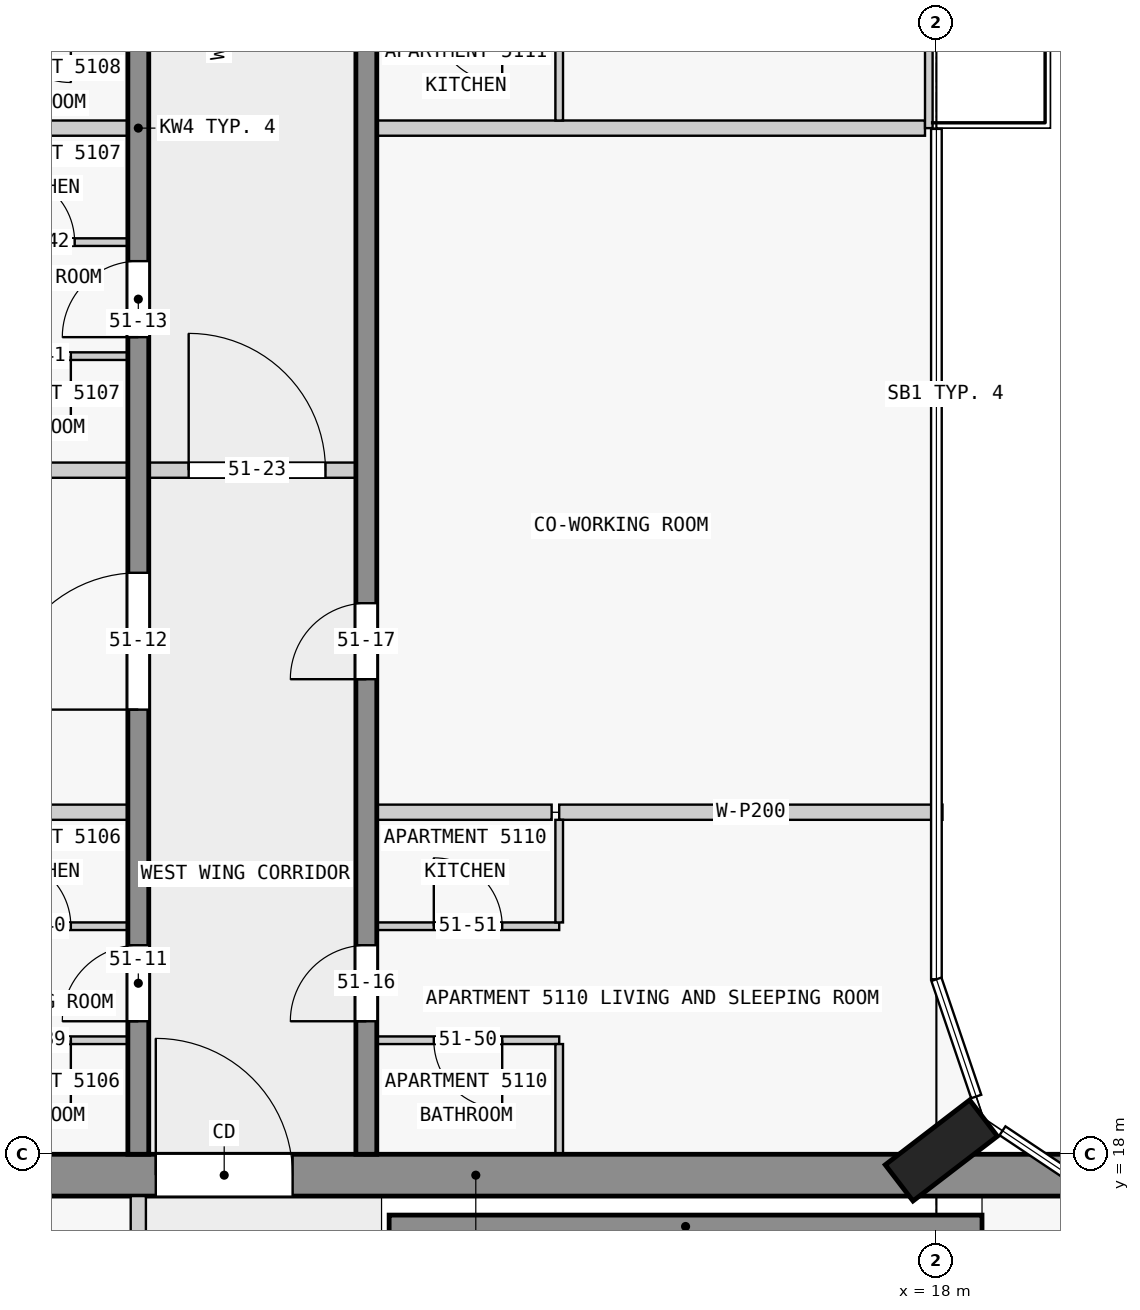
"""IFC4 building model, lengths in metres.
Left out: names, types, materials, properties, quantities, classifications, styles, units other than length and angle.
Written with IfcOpenShell. Run it as: python <this file> out.ifc"""

import sys

from ifc_helpers import new_model, si_unit, direction, frame, frame_2d, origin, origin_2d, place, context, subcontext, project, spatial, rectangle, extrude, element, fill, save


model = new_model("IFC4")
c1 = context("Model", 3, precision=1e-05, world=origin(), true_north=direction((0.0, 1.0)))
c2 = subcontext(c1, "Body", "Model", "MODEL_VIEW")
j1 = project(units=[si_unit("LENGTHUNIT", "METRE"), si_unit("PLANEANGLEUNIT", "RADIAN")], contexts=[c1])
p1 = place(None, origin())
s1 = spatial("IfcSite", under=j1, at=p1, CompositionType="ELEMENT")
p2 = place(p1, origin())
s2 = spatial("IfcBuilding", under=s1, at=p2, CompositionType="ELEMENT")
p3 = place(p2, frame((0.0, 0.0, 197.9)))
s3 = spatial("IfcBuildingStorey", under=s2, at=p3, CompositionType="ELEMENT", Elevation=197.9)
p4 = place(p3, frame((18.065, 18.05, 0.0), z_axis=(0.0, 0.0, 1.0), x_axis=(-0.608810846443, 0.793315418515, 0.0)))
e1 = element("IfcColumn", 1, at=p4, inside=s3, PredefinedType="COLUMN", context=c2, shape_type="SweptSolid", body=[
    extrude(rectangle(XDim=0.6, YDim=1.4, at=origin_2d()), origin(), (0.0, 0.0, 1.0), 3.5),
])
p5 = place(p3, frame((1.38, 17.725, 0.0), z_axis=(0.0, 0.0, 1.0), x_axis=(1.0, 0.0, 0.0)))
e2 = element("IfcWall", 2, at=p5, inside=s3, PredefinedType="SHEAR", context=c2, shape_type="SweptSolid", body=[
    extrude(rectangle(XDim=21.12, YDim=0.55, at=frame_2d((10.56, 0.0))), origin(), (0.0, 0.0, 1.0), 3.25),
])
p6 = place(p5, frame((6.35, 0.0, 0.0)))
e3 = element("IfcOpeningElement", 3, at=p6, cuts=e2, PredefinedType="OPENING", context=c2, shape_type="SweptSolid", body=[
    extrude(rectangle(XDim=1.8, YDim=2.1, at=frame_2d((0.9, 1.05))), frame((0.0, 0.285, 0.0), z_axis=(0.0, -1.0, 0.0), x_axis=(1.0, 0.0, 0.0)), (0.0, 0.0, 1.0), 0.57),
])
p7 = place(p3, frame((10.8, 17.05, 0.0), z_axis=(0.0, 0.0, 1.0), x_axis=(1.0, 0.0, 0.0)))
e4 = element("IfcWall", 4, at=p7, inside=s3, PredefinedType="SHEAR", context=c2, shape_type="SweptSolid", body=[
    extrude(rectangle(XDim=7.8, YDim=0.3, at=frame_2d((3.9, 0.0))), origin(), (0.0, 0.0, 1.0), 3.25),
])
p8 = place(p3, frame((7.5, 18.0, 0.0), z_axis=(0.0, 0.0, 1.0), x_axis=(0.0, 1.0, 0.0)))
e5 = element("IfcWall", 5, at=p8, inside=s3, PredefinedType="SHEAR", context=c2, shape_type="SweptSolid", body=[
    extrude(rectangle(XDim=27.0, YDim=0.275, at=frame_2d((13.5, 0.0))), origin(), (0.0, 0.0, 1.0), 3.25),
])
p9 = place(p8, frame((1.75, 0.0, 0.0)))
e6 = element("IfcOpeningElement", 6, at=p9, cuts=e5, PredefinedType="OPENING", context=c2, shape_type="SweptSolid", body=[
    extrude(rectangle(XDim=1.0, YDim=2.1, at=frame_2d((0.5, 1.05))), frame((0.0, 0.147, 0.0), z_axis=(0.0, -1.0, 0.0), x_axis=(1.0, 0.0, 0.0)), (0.0, 0.0, 1.0), 0.295),
])
p10 = place(p8, frame((5.85, 0.0, 0.0)))
e7 = element("IfcOpeningElement", 7, at=p10, cuts=e5, PredefinedType="OPENING", context=c2, shape_type="SweptSolid", body=[
    extrude(rectangle(XDim=1.8, YDim=2.1, at=frame_2d((0.9, 1.05))), frame((0.0, 0.147, 0.0), z_axis=(0.0, -1.0, 0.0), x_axis=(1.0, 0.0, 0.0)), (0.0, 0.0, 1.0), 0.295),
])
p11 = place(p8, frame((10.75, 0.0, 0.0)))
e8 = element("IfcOpeningElement", 8, at=p11, cuts=e5, PredefinedType="OPENING", context=c2, shape_type="SweptSolid", body=[
    extrude(rectangle(XDim=1.0, YDim=2.1, at=frame_2d((0.5, 1.05))), frame((0.0, 0.147, 0.0), z_axis=(0.0, -1.0, 0.0), x_axis=(1.0, 0.0, 0.0)), (0.0, 0.0, 1.0), 0.295),
])
p12 = place(p8, frame((15.25, 0.0, 0.0)))
e9 = element("IfcOpeningElement", 9, at=p12, cuts=e5, PredefinedType="OPENING", context=c2, shape_type="SweptSolid", body=[
    extrude(rectangle(XDim=1.0, YDim=2.1, at=frame_2d((0.5, 1.05))), frame((0.0, 0.147, 0.0), z_axis=(0.0, -1.0, 0.0), x_axis=(1.0, 0.0, 0.0)), (0.0, 0.0, 1.0), 0.295),
])
p13 = place(p8, frame((21.35, 0.0, 0.0)))
e10 = element("IfcOpeningElement", 10, at=p13, cuts=e5, PredefinedType="OPENING", context=c2, shape_type="SweptSolid", body=[
    extrude(rectangle(XDim=1.0, YDim=2.1, at=frame_2d((0.5, 1.05))), frame((0.0, 0.147, 0.0), z_axis=(0.0, -1.0, 0.0), x_axis=(1.0, 0.0, 0.0)), (0.0, 0.0, 1.0), 0.295),
])
p14 = place(p3, frame((10.5, 18.0, 0.0), z_axis=(0.0, 0.0, 1.0), x_axis=(0.0, 1.0, 0.0)))
e11 = element("IfcWall", 11, at=p14, inside=s3, PredefinedType="SHEAR", context=c2, shape_type="SweptSolid", body=[
    extrude(rectangle(XDim=27.0, YDim=0.275, at=frame_2d((13.5, 0.0))), origin(), (0.0, 0.0, 1.0), 3.25),
])
p15 = place(p14, frame((1.75, 0.0, 0.0)))
e12 = element("IfcOpeningElement", 12, at=p15, cuts=e11, PredefinedType="OPENING", context=c2, shape_type="SweptSolid", body=[
    extrude(rectangle(XDim=1.0, YDim=2.1, at=frame_2d((0.5, 1.05))), frame((0.0, 0.147, 0.0), z_axis=(0.0, -1.0, 0.0), x_axis=(1.0, 0.0, 0.0)), (0.0, 0.0, 1.0), 0.295),
])
p16 = place(p14, frame((6.25, 0.0, 0.0)))
e13 = element("IfcOpeningElement", 13, at=p16, cuts=e11, PredefinedType="OPENING", context=c2, shape_type="SweptSolid", body=[
    extrude(rectangle(XDim=1.0, YDim=2.1, at=frame_2d((0.5, 1.05))), frame((0.0, 0.147, 0.0), z_axis=(0.0, -1.0, 0.0), x_axis=(1.0, 0.0, 0.0)), (0.0, 0.0, 1.0), 0.295),
])
p17 = place(p14, frame((15.25, 0.0, 0.0)))
e14 = element("IfcOpeningElement", 14, at=p17, cuts=e11, PredefinedType="OPENING", context=c2, shape_type="SweptSolid", body=[
    extrude(rectangle(XDim=1.0, YDim=2.1, at=frame_2d((0.5, 1.05))), frame((0.0, 0.147, 0.0), z_axis=(0.0, -1.0, 0.0), x_axis=(1.0, 0.0, 0.0)), (0.0, 0.0, 1.0), 0.295),
])
p18 = place(p14, frame((19.75, 0.0, 0.0)))
e15 = element("IfcOpeningElement", 15, at=p18, cuts=e11, PredefinedType="OPENING", context=c2, shape_type="SweptSolid", body=[
    extrude(rectangle(XDim=1.0, YDim=2.1, at=frame_2d((0.5, 1.05))), frame((0.0, 0.147, 0.0), z_axis=(0.0, -1.0, 0.0), x_axis=(1.0, 0.0, 0.0)), (0.0, 0.0, 1.0), 0.295),
])
p19 = place(p14, frame((23.25, 0.0, 0.0)))
e16 = element("IfcOpeningElement", 16, at=p19, cuts=e11, PredefinedType="OPENING", context=c2, shape_type="SweptSolid", body=[
    extrude(rectangle(XDim=0.9, YDim=2.1, at=frame_2d((0.45, 1.05))), frame((0.0, 0.147, 0.0), z_axis=(0.0, -1.0, 0.0), x_axis=(1.0, 0.0, 0.0)), (0.0, 0.0, 1.0), 0.295),
])
p20 = place(p14, frame((25.45, 0.0, 0.0)))
e17 = element("IfcOpeningElement", 17, at=p20, cuts=e11, PredefinedType="OPENING", context=c2, shape_type="SweptSolid", body=[
    extrude(rectangle(XDim=1.0, YDim=2.1, at=frame_2d((0.5, 1.05))), frame((0.0, 0.147, 0.0), z_axis=(0.0, -1.0, 0.0), x_axis=(1.0, 0.0, 0.0)), (0.0, 0.0, 1.0), 0.295),
])
p21 = place(p3, frame((17.9, 36.0, 0.0), z_axis=(0.0, 0.0, 1.0), x_axis=(0.0, -1.0, 0.0)))
e18 = element("IfcWall", 18, at=p21, inside=s3, PredefinedType="STANDARD", context=c2, shape_type="SweptSolid", body=[
    extrude(rectangle(XDim=4.5, YDim=0.1, at=frame_2d((2.25, 0.0))), origin(), (0.0, 0.0, 1.0), 3.25),
])
p22 = place(p21, frame((1.05, 0.0, 0.0)))
e19 = element("IfcOpeningElement", 19, at=p22, cuts=e18, PredefinedType="OPENING", context=c2, shape_type="SweptSolid", body=[
    extrude(rectangle(XDim=2.4, YDim=2.4, at=frame_2d((1.2, 1.2))), frame((0.0, 0.06, 0.0), z_axis=(0.0, -1.0, 0.0), x_axis=(1.0, 0.0, 0.0)), (0.0, 0.0, 1.0), 0.12),
])
p23 = place(p3, frame((7.5, 10.1, 0.0), z_axis=(0.0, 0.0, 1.0), x_axis=(0.0, 1.0, 0.0)))
e20 = element("IfcWall", 20, at=p23, inside=s3, PredefinedType="PARTITIONING", context=c2, shape_type="SweptSolid", body=[
    extrude(rectangle(XDim=7.35, YDim=0.2, at=frame_2d((3.675, 0.0))), origin(), (0.0, 0.0, 1.0), 3.25),
])
p24 = place(p23, frame((0.8, 0.0, 0.0)))
e21 = element("IfcOpeningElement", 21, at=p24, cuts=e20, PredefinedType="OPENING", context=c2, shape_type="SweptSolid", body=[
    extrude(rectangle(XDim=0.9, YDim=2.1, at=frame_2d((0.45, 1.05))), frame((0.0, 0.11, 0.0), z_axis=(0.0, -1.0, 0.0), x_axis=(1.0, 0.0, 0.0)), (0.0, 0.0, 1.0), 0.22),
])
p25 = place(p23, frame((3.3, 0.0, 0.0)))
e22 = element("IfcOpeningElement", 22, at=p25, cuts=e20, PredefinedType="OPENING", context=c2, shape_type="SweptSolid", body=[
    extrude(rectangle(XDim=0.9, YDim=2.1, at=frame_2d((0.45, 1.05))), frame((0.0, 0.11, 0.0), z_axis=(0.0, -1.0, 0.0), x_axis=(1.0, 0.0, 0.0)), (0.0, 0.0, 1.0), 0.22),
])
p26 = place(p23, frame((5.25, 0.0, 0.0)))
e23 = element("IfcOpeningElement", 23, at=p26, cuts=e20, PredefinedType="OPENING", context=c2, shape_type="SweptSolid", body=[
    extrude(rectangle(XDim=0.9, YDim=2.1, at=frame_2d((0.45, 1.05))), frame((0.0, 0.11, 0.0), z_axis=(0.0, -1.0, 0.0), x_axis=(1.0, 0.0, 0.0)), (0.0, 0.0, 1.0), 0.22),
])
p27 = place(p3, frame((7.363, 19.5, 0.0), z_axis=(0.0, 0.0, 1.0), x_axis=(-1.0, 0.0, 0.0)))
e24 = element("IfcWall", 24, at=p27, inside=s3, PredefinedType="PARTITIONING", context=c2, shape_type="SweptSolid", body=[
    extrude(rectangle(XDim=2.4, YDim=0.1, at=frame_2d((1.2, 0.0))), origin(), (0.0, 0.0, 1.0), 3.25),
])
p28 = place(p27, frame((0.75, 0.0, 0.0)))
e25 = element("IfcOpeningElement", 25, at=p28, cuts=e24, PredefinedType="OPENING", context=c2, shape_type="SweptSolid", body=[
    extrude(rectangle(XDim=0.9, YDim=2.1, at=frame_2d((0.45, 1.05))), frame((0.0, 0.06, 0.0), z_axis=(0.0, -1.0, 0.0), x_axis=(1.0, 0.0, 0.0)), (0.0, 0.0, 1.0), 0.12),
])
p29 = place(p3, frame((13.038, 19.5, 0.0), z_axis=(0.0, 0.0, 1.0), x_axis=(-1.0, 0.0, 0.0)))
e26 = element("IfcWall", 26, at=p29, inside=s3, PredefinedType="PARTITIONING", context=c2, shape_type="SweptSolid", body=[
    extrude(rectangle(XDim=2.4, YDim=0.1, at=frame_2d((1.2, 0.0))), origin(), (0.0, 0.0, 1.0), 3.25),
])
p30 = place(p29, frame((0.75, 0.0, 0.0)))
e27 = element("IfcOpeningElement", 27, at=p30, cuts=e26, PredefinedType="OPENING", context=c2, shape_type="SweptSolid", body=[
    extrude(rectangle(XDim=0.9, YDim=2.1, at=frame_2d((0.45, 1.05))), frame((0.0, 0.06, 0.0), z_axis=(0.0, -1.0, 0.0), x_axis=(1.0, 0.0, 0.0)), (0.0, 0.0, 1.0), 0.12),
])
p31 = place(p3, frame((4.962, 21.0, 0.0), z_axis=(0.0, 0.0, 1.0), x_axis=(1.0, 0.0, 0.0)))
e28 = element("IfcWall", 28, at=p31, inside=s3, PredefinedType="PARTITIONING", context=c2, shape_type="SweptSolid", body=[
    extrude(rectangle(XDim=2.4, YDim=0.1, at=frame_2d((1.2, 0.0))), origin(), (0.0, 0.0, 1.0), 3.25),
])
p32 = place(p31, frame((0.75, 0.0, 0.0)))
e29 = element("IfcOpeningElement", 29, at=p32, cuts=e28, PredefinedType="OPENING", context=c2, shape_type="SweptSolid", body=[
    extrude(rectangle(XDim=0.9, YDim=2.1, at=frame_2d((0.45, 1.05))), frame((0.0, 0.06, 0.0), z_axis=(0.0, -1.0, 0.0), x_axis=(1.0, 0.0, 0.0)), (0.0, 0.0, 1.0), 0.12),
])
p33 = place(p3, frame((10.637, 21.0, 0.0), z_axis=(0.0, 0.0, 1.0), x_axis=(1.0, 0.0, 0.0)))
e30 = element("IfcWall", 30, at=p33, inside=s3, PredefinedType="PARTITIONING", context=c2, shape_type="SweptSolid", body=[
    extrude(rectangle(XDim=2.4, YDim=0.1, at=frame_2d((1.2, 0.0))), origin(), (0.0, 0.0, 1.0), 3.25),
])
p34 = place(p33, frame((0.75, 0.0, 0.0)))
e31 = element("IfcOpeningElement", 31, at=p34, cuts=e30, PredefinedType="OPENING", context=c2, shape_type="SweptSolid", body=[
    extrude(rectangle(XDim=0.9, YDim=2.1, at=frame_2d((0.45, 1.05))), frame((0.0, 0.06, 0.0), z_axis=(0.0, -1.0, 0.0), x_axis=(1.0, 0.0, 0.0)), (0.0, 0.0, 1.0), 0.12),
])
for number, where, z_axis, x_axis in (
    (32, (7.363, 22.5, 0.0), (0.0, 0.0, 1.0), (-1.0, 0.0, 0.0)),
    (33, (12.938, 22.5, 0.0), (0.0, 0.0, 1.0), (-1.0, 0.0, 0.0)),
):
    element("IfcWall", number, at=place(p3, frame(where, z_axis=z_axis, x_axis=x_axis)), inside=s3, PredefinedType="PARTITIONING", context=c2, shape_type="SweptSolid", body=[
        extrude(rectangle(XDim=2.3, YDim=0.2, at=frame_2d((1.15, 0.0))), origin(), (0.0, 0.0, 1.0), 3.25),
    ])
p35 = place(p3, frame((13.038, 22.5, 0.0), z_axis=(0.0, 0.0, 1.0), x_axis=(1.0, 0.0, 0.0)))
e34 = element("IfcWall", 34, at=p35, inside=s3, PredefinedType="PARTITIONING", context=c2, shape_type="SweptSolid", body=[
    extrude(rectangle(XDim=5.042, YDim=0.2, at=frame_2d((2.521, 0.0))), origin(), (0.0, 0.0, 1.0), 3.25),
])
p36 = place(p3, frame((7.363, 27.0, 0.0), z_axis=(0.0, 0.0, 1.0), x_axis=(-1.0, 0.0, 0.0)))
e35 = element("IfcWall", 35, at=p36, inside=s3, PredefinedType="PARTITIONING", context=c2, shape_type="SweptSolid", body=[
    extrude(rectangle(XDim=7.443, YDim=0.2, at=frame_2d((3.721, 0.0))), origin(), (0.0, 0.0, 1.0), 3.25),
])
p37 = place(p3, frame((7.363, 28.5, 0.0), z_axis=(0.0, 0.0, 1.0), x_axis=(-1.0, 0.0, 0.0)))
e36 = element("IfcWall", 36, at=p37, inside=s3, PredefinedType="PARTITIONING", context=c2, shape_type="SweptSolid", body=[
    extrude(rectangle(XDim=2.4, YDim=0.1, at=frame_2d((1.2, 0.0))), origin(), (0.0, 0.0, 1.0), 3.25),
])
p38 = place(p37, frame((0.75, 0.0, 0.0)))
e37 = element("IfcOpeningElement", 37, at=p38, cuts=e36, PredefinedType="OPENING", context=c2, shape_type="SweptSolid", body=[
    extrude(rectangle(XDim=0.9, YDim=2.1, at=frame_2d((0.45, 1.05))), frame((0.0, 0.06, 0.0), z_axis=(0.0, -1.0, 0.0), x_axis=(1.0, 0.0, 0.0)), (0.0, 0.0, 1.0), 0.12),
])
p39 = place(p3, frame((5.012, 30.0, 0.0), z_axis=(0.0, 0.0, 1.0), x_axis=(1.0, 0.0, 0.0)))
e38 = element("IfcWall", 38, at=p39, inside=s3, PredefinedType="PARTITIONING", context=c2, shape_type="SweptSolid", body=[
    extrude(rectangle(XDim=2.35, YDim=0.1, at=frame_2d((1.175, 0.0))), origin(), (0.0, 0.0, 1.0), 3.25),
])
p40 = place(p39, frame((0.75, 0.0, 0.0)))
e39 = element("IfcOpeningElement", 39, at=p40, cuts=e38, PredefinedType="OPENING", context=c2, shape_type="SweptSolid", body=[
    extrude(rectangle(XDim=0.9, YDim=2.1, at=frame_2d((0.45, 1.05))), frame((0.0, 0.06, 0.0), z_axis=(0.0, -1.0, 0.0), x_axis=(1.0, 0.0, 0.0)), (0.0, 0.0, 1.0), 0.12),
])
p41 = place(p3, frame((7.363, 31.5, 0.0), z_axis=(0.0, 0.0, 1.0), x_axis=(-1.0, 0.0, 0.0)))
e40 = element("IfcWall", 40, at=p41, inside=s3, PredefinedType="PARTITIONING", context=c2, shape_type="SweptSolid", body=[
    extrude(rectangle(XDim=2.3, YDim=0.2, at=frame_2d((1.15, 0.0))), origin(), (0.0, 0.0, 1.0), 3.25),
])
p42 = place(p3, frame((17.85, 31.5, 0.0), z_axis=(0.0, 0.0, 1.0), x_axis=(-1.0, 0.0, 0.0)))
e41 = element("IfcWall", 41, at=p42, inside=s3, PredefinedType="PARTITIONING", context=c2, shape_type="SweptSolid", body=[
    extrude(rectangle(XDim=7.213, YDim=0.2, at=frame_2d((3.606, 0.0))), origin(), (0.0, 0.0, 1.0), 3.25),
])
p43 = place(p3, frame((13.038, 18.0, 0.0), z_axis=(0.0, 0.0, 1.0), x_axis=(0.0, 1.0, 0.0)))
e42 = element("IfcWall", 42, at=p43, inside=s3, PredefinedType="PARTITIONING", context=c2, shape_type="SweptSolid", body=[
    extrude(rectangle(XDim=1.45, YDim=0.1, at=frame_2d((0.725, 0.0))), origin(), (0.0, 0.0, 1.0), 3.25),
])
for number, where, z_axis, x_axis in (
    (43, (13.038, 21.05, 0.0), (0.0, 0.0, 1.0), (0.0, 1.0, 0.0)),
    (44, (13.038, 31.6, 0.0), (0.0, 0.0, 1.0), (0.0, 1.0, 0.0)),
):
    element("IfcWall", number, at=place(p3, frame(where, z_axis=z_axis, x_axis=x_axis)), inside=s3, PredefinedType="PARTITIONING", context=c2, shape_type="SweptSolid", body=[
        extrude(rectangle(XDim=1.35, YDim=0.1, at=frame_2d((0.675, 0.0))), origin(), (0.0, 0.0, 1.0), 3.25),
    ])
p44 = place(p3, frame((7.462, 27.0, 0.0), z_axis=(0.0, 0.0, 1.0), x_axis=(1.0, 0.0, 0.0)))
e45 = element("IfcWall", 45, at=p44, inside=s3, PredefinedType="PARTITIONING", context=c2, shape_type="SweptSolid", body=[
    extrude(rectangle(XDim=3.175, YDim=0.2, at=frame_2d((1.587, 0.0))), origin(), (0.0, 0.0, 1.0), 3.25),
])
p45 = place(p44, frame((0.7, 0.0, 0.0)))
e46 = element("IfcOpeningElement", 46, at=p45, cuts=e45, PredefinedType="OPENING", context=c2, shape_type="SweptSolid", body=[
    extrude(rectangle(XDim=1.8, YDim=2.1, at=frame_2d((0.9, 1.05))), frame((0.0, 0.11, 0.0), z_axis=(0.0, -1.0, 0.0), x_axis=(1.0, 0.0, 0.0)), (0.0, 0.0, 1.0), 0.22),
])
p46 = place(p6, origin())
e47 = element("IfcDoor", 47, at=p46, inside=s3, OperationType="DOUBLE_DOOR_SINGLE_SWING", PredefinedType="DOOR", context=c2, shape_type="SweptSolid", body=[
    extrude(rectangle(XDim=1.8, YDim=2.1, at=frame_2d((0.9, 1.05))), frame((0.0, 0.025, 0.0), z_axis=(0.0, -1.0, 0.0), x_axis=(1.0, 0.0, 0.0)), (0.0, 0.0, 1.0), 0.05),
])
fill(e3, e47)
p47 = place(p9, origin())
e48 = element("IfcDoor", 48, at=p47, inside=s3, OperationType="SINGLE_SWING_LEFT", PredefinedType="DOOR", context=c2, shape_type="SweptSolid", body=[
    extrude(rectangle(XDim=1.0, YDim=2.1, at=frame_2d((0.5, 1.05))), frame((0.0, 0.025, 0.0), z_axis=(0.0, -1.0, 0.0), x_axis=(1.0, 0.0, 0.0)), (0.0, 0.0, 1.0), 0.05),
])
fill(e6, e48)
p48 = place(p10, origin())
e49 = element("IfcDoor", 49, at=p48, inside=s3, OperationType="SINGLE_SWING_LEFT", PredefinedType="DOOR", context=c2, shape_type="SweptSolid", body=[
    extrude(rectangle(XDim=1.8, YDim=2.1, at=frame_2d((0.9, 1.05))), frame((0.0, 0.025, 0.0), z_axis=(0.0, -1.0, 0.0), x_axis=(1.0, 0.0, 0.0)), (0.0, 0.0, 1.0), 0.05),
])
fill(e7, e49)
p49 = place(p11, origin())
e50 = element("IfcDoor", 50, at=p49, inside=s3, OperationType="SINGLE_SWING_LEFT", PredefinedType="DOOR", context=c2, shape_type="SweptSolid", body=[
    extrude(rectangle(XDim=1.0, YDim=2.1, at=frame_2d((0.5, 1.05))), frame((0.0, 0.025, 0.0), z_axis=(0.0, -1.0, 0.0), x_axis=(1.0, 0.0, 0.0)), (0.0, 0.0, 1.0), 0.05),
])
fill(e8, e50)
p50 = place(p15, origin())
e51 = element("IfcDoor", 51, at=p50, inside=s3, OperationType="SINGLE_SWING_LEFT", PredefinedType="DOOR", context=c2, shape_type="SweptSolid", body=[
    extrude(rectangle(XDim=1.0, YDim=2.1, at=frame_2d((0.5, 1.05))), frame((0.0, 0.025, 0.0), z_axis=(0.0, -1.0, 0.0), x_axis=(1.0, 0.0, 0.0)), (0.0, 0.0, 1.0), 0.05),
])
fill(e12, e51)
p51 = place(p16, origin())
e52 = element("IfcDoor", 52, at=p51, inside=s3, OperationType="SINGLE_SWING_LEFT", PredefinedType="DOOR", context=c2, shape_type="SweptSolid", body=[
    extrude(rectangle(XDim=1.0, YDim=2.1, at=frame_2d((0.5, 1.05))), frame((0.0, 0.025, 0.0), z_axis=(0.0, -1.0, 0.0), x_axis=(1.0, 0.0, 0.0)), (0.0, 0.0, 1.0), 0.05),
])
fill(e13, e52)
p52 = place(p45, origin())
e53 = element("IfcDoor", 53, at=p52, inside=s3, OperationType="SINGLE_SWING_RIGHT", PredefinedType="DOOR", context=c2, shape_type="SweptSolid", body=[
    extrude(rectangle(XDim=1.8, YDim=2.1, at=frame_2d((0.9, 1.05))), frame((0.0, 0.025, 0.0), z_axis=(0.0, -1.0, 0.0), x_axis=(1.0, 0.0, 0.0)), (0.0, 0.0, 1.0), 0.05),
])
fill(e46, e53)
p53 = place(p28, origin())
e54 = element("IfcDoor", 54, at=p53, inside=s3, OperationType="SINGLE_SWING_RIGHT", PredefinedType="DOOR", context=c2, shape_type="SweptSolid", body=[
    extrude(rectangle(XDim=0.9, YDim=2.1, at=frame_2d((0.45, 1.05))), frame((0.0, 0.025, 0.0), z_axis=(0.0, -1.0, 0.0), x_axis=(1.0, 0.0, 0.0)), (0.0, 0.0, 1.0), 0.05),
])
fill(e25, e54)
p54 = place(p32, origin())
e55 = element("IfcDoor", 55, at=p54, inside=s3, OperationType="SINGLE_SWING_RIGHT", PredefinedType="DOOR", context=c2, shape_type="SweptSolid", body=[
    extrude(rectangle(XDim=0.9, YDim=2.1, at=frame_2d((0.45, 1.05))), frame((0.0, 0.025, 0.0), z_axis=(0.0, -1.0, 0.0), x_axis=(1.0, 0.0, 0.0)), (0.0, 0.0, 1.0), 0.05),
])
fill(e29, e55)
p55 = place(p38, origin())
e56 = element("IfcDoor", 56, at=p55, inside=s3, OperationType="SINGLE_SWING_RIGHT", PredefinedType="DOOR", context=c2, shape_type="SweptSolid", body=[
    extrude(rectangle(XDim=0.9, YDim=2.1, at=frame_2d((0.45, 1.05))), frame((0.0, 0.025, 0.0), z_axis=(0.0, -1.0, 0.0), x_axis=(1.0, 0.0, 0.0)), (0.0, 0.0, 1.0), 0.05),
])
fill(e37, e56)
p56 = place(p40, origin())
e57 = element("IfcDoor", 57, at=p56, inside=s3, OperationType="SINGLE_SWING_RIGHT", PredefinedType="DOOR", context=c2, shape_type="SweptSolid", body=[
    extrude(rectangle(XDim=0.9, YDim=2.1, at=frame_2d((0.45, 1.05))), frame((0.0, 0.025, 0.0), z_axis=(0.0, -1.0, 0.0), x_axis=(1.0, 0.0, 0.0)), (0.0, 0.0, 1.0), 0.05),
])
fill(e39, e57)
p57 = place(p30, origin())
e58 = element("IfcDoor", 58, at=p57, inside=s3, OperationType="SINGLE_SWING_LEFT", PredefinedType="DOOR", context=c2, shape_type="SweptSolid", body=[
    extrude(rectangle(XDim=0.9, YDim=2.1, at=frame_2d((0.45, 1.05))), frame((0.0, 0.025, 0.0), z_axis=(0.0, -1.0, 0.0), x_axis=(1.0, 0.0, 0.0)), (0.0, 0.0, 1.0), 0.05),
])
fill(e27, e58)
p58 = place(p34, origin())
e59 = element("IfcDoor", 59, at=p58, inside=s3, OperationType="SINGLE_SWING_LEFT", PredefinedType="DOOR", context=c2, shape_type="SweptSolid", body=[
    extrude(rectangle(XDim=0.9, YDim=2.1, at=frame_2d((0.45, 1.05))), frame((0.0, 0.025, 0.0), z_axis=(0.0, -1.0, 0.0), x_axis=(1.0, 0.0, 0.0)), (0.0, 0.0, 1.0), 0.05),
])
fill(e31, e59)
save(model, sys.argv[1])
